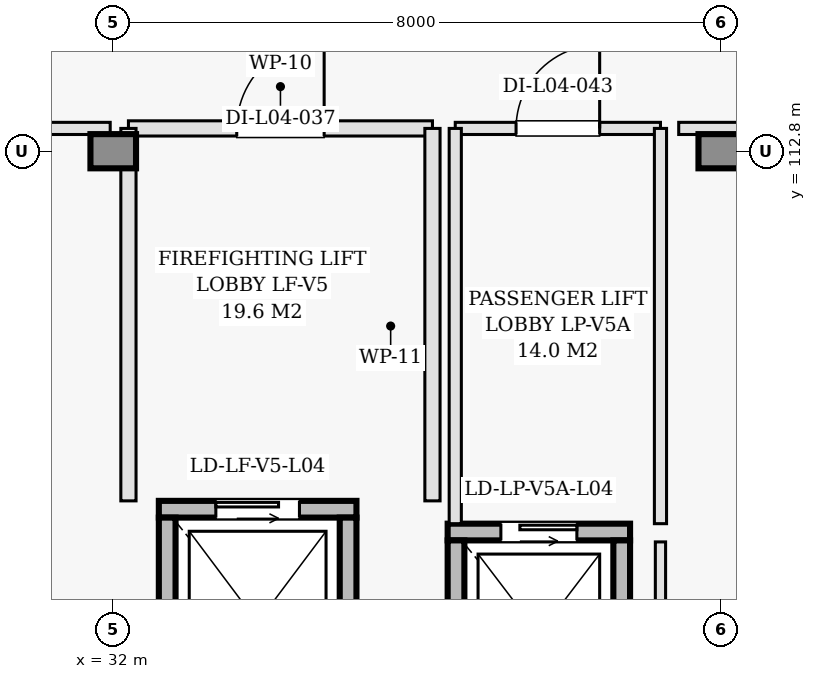
"""IFC4 building model, lengths in metres.
Left out: names, types, materials, properties, quantities, classifications, styles, units other than length and angle.
Written with IfcOpenShell. Run it as: python <this file> out.ifc"""

import sys

from ifc_helpers import new_model, si_unit, direction, frame, frame_2d, origin, origin_2d, place, context, subcontext, project, spatial, rectangle, extrude, element, fill, save


model = new_model("IFC4")
c1 = context("Model", 3, precision=1e-05, world=origin(), true_north=direction((0.0, 1.0)))
c2 = subcontext(c1, "Body", "Model", "MODEL_VIEW")
j1 = project(units=[si_unit("LENGTHUNIT", "METRE"), si_unit("PLANEANGLEUNIT", "RADIAN")], contexts=[c1])
p1 = place(None, origin())
s1 = spatial("IfcSite", under=j1, at=p1, CompositionType="ELEMENT")
p2 = place(p1, origin())
s2 = spatial("IfcBuilding", under=s1, at=p2, CompositionType="ELEMENT")
p3 = place(p2, frame((0.0, 0.0, 18.0)))
s3 = spatial("IfcBuildingStorey", under=s2, at=p3, CompositionType="ELEMENT", Elevation=18.0)
for number, where, z_axis, x_axis in (
    (1, (32.0, 112.8, 0.0), (0.0, 0.0, 1.0), (1.0, 0.0, 0.0)),
    (2, (40.0, 112.8, 0.0), (0.0, 0.0, 1.0), (1.0, 0.0, 0.0)),
):
    element("IfcColumn", number, at=place(p3, frame(where, z_axis=z_axis, x_axis=x_axis)), inside=s3, PredefinedType="COLUMN", context=c2, shape_type="SweptSolid", body=[
        extrude(rectangle(XDim=0.45, YDim=0.45, at=origin_2d()), origin(), (0.0, 0.0, 1.0), 4.2),
    ])
p4 = place(p3, frame((32.6, 108.09, 0.0), z_axis=(0.0, 0.0, 1.0), x_axis=(1.0, 0.0, 0.0)))
e3 = element("IfcWall", 3, at=p4, inside=s3, PredefinedType="SHEAR", context=c2, shape_type="SweptSolid", body=[
    extrude(rectangle(XDim=2.6, YDim=0.22, at=frame_2d((1.3, 0.0))), origin(), (0.0, 0.0, 1.0), 3.85),
])
p5 = place(p4, frame((0.75, 0.0, 0.0)))
e4 = element("IfcOpeningElement", 4, at=p5, cuts=e3, PredefinedType="OPENING", context=c2, shape_type="SweptSolid", body=[
    extrude(rectangle(XDim=1.1, YDim=2.15, at=frame_2d((0.55, 1.075))), frame((0.0, 0.12, 0.0), z_axis=(0.0, -1.0, 0.0), x_axis=(1.0, 0.0, 0.0)), (0.0, 0.0, 1.0), 0.24),
])
for number, where, z_axis, x_axis in (
    (5, (32.71, 105.22, 0.0), (0.0, 0.0, 1.0), (0.0, 1.0, 0.0)),
    (6, (35.09, 105.22, 0.0), (0.0, 0.0, 1.0), (0.0, 1.0, 0.0)),
):
    element("IfcWall", number, at=place(p3, frame(where, z_axis=z_axis, x_axis=x_axis)), inside=s3, PredefinedType="SHEAR", context=c2, shape_type="SweptSolid", body=[
        extrude(rectangle(XDim=2.76, YDim=0.22, at=frame_2d((1.38, 0.0))), origin(), (0.0, 0.0, 1.0), 3.85),
    ])
p6 = place(p3, frame((32.2, 113.1, 0.0), z_axis=(0.0, 0.0, 1.0), x_axis=(1.0, 0.0, 0.0)))
e7 = element("IfcWall", 7, at=p6, inside=s3, PredefinedType="PARTITIONING", context=c2, shape_type="SweptSolid", body=[
    extrude(rectangle(XDim=4.0, YDim=0.2, at=frame_2d((2.0, 0.0))), origin(), (0.0, 0.0, 1.0), 3.85),
])
p7 = place(p6, frame((1.425, 0.0, 0.0)))
e8 = element("IfcOpeningElement", 8, at=p7, cuts=e7, PredefinedType="OPENING", context=c2, shape_type="SweptSolid", body=[
    extrude(rectangle(XDim=1.15, YDim=2.15, at=frame_2d((0.575, 1.075))), frame((0.0, 0.11, 0.0), z_axis=(0.0, -1.0, 0.0), x_axis=(1.0, 0.0, 0.0)), (0.0, 0.0, 1.0), 0.22),
])
for number, where, z_axis, x_axis in (
    (9, (32.2, 108.2, 0.0), (0.0, 0.0, 1.0), (0.0, 1.0, 0.0)),
    (10, (36.2, 108.2, 0.0), (0.0, 0.0, 1.0), (0.0, 1.0, 0.0)),
):
    element("IfcWall", number, at=place(p3, frame(where, z_axis=z_axis, x_axis=x_axis)), inside=s3, PredefinedType="PARTITIONING", context=c2, shape_type="SweptSolid", body=[
        extrude(rectangle(XDim=4.9, YDim=0.2, at=frame_2d((2.45, 0.0))), origin(), (0.0, 0.0, 1.0), 3.85),
    ])
p8 = place(p3, frame((36.4, 107.79, 0.0), z_axis=(0.0, 0.0, 1.0), x_axis=(1.0, 0.0, 0.0)))
e11 = element("IfcWall", 11, at=p8, inside=s3, PredefinedType="SHEAR", context=c2, shape_type="SweptSolid", body=[
    extrude(rectangle(XDim=2.4, YDim=0.22, at=frame_2d((1.2, 0.0))), origin(), (0.0, 0.0, 1.0), 3.85),
])
p9 = place(p8, frame((0.7, 0.0, 0.0)))
e12 = element("IfcOpeningElement", 12, at=p9, cuts=e11, PredefinedType="OPENING", context=c2, shape_type="SweptSolid", body=[
    extrude(rectangle(XDim=1.0, YDim=2.15, at=frame_2d((0.5, 1.075))), frame((0.0, 0.12, 0.0), z_axis=(0.0, -1.0, 0.0), x_axis=(1.0, 0.0, 0.0)), (0.0, 0.0, 1.0), 0.24),
])
for number, where, z_axis, x_axis in (
    (13, (36.51, 105.22, 0.0), (0.0, 0.0, 1.0), (0.0, 1.0, 0.0)),
    (14, (38.69, 105.22, 0.0), (0.0, 0.0, 1.0), (0.0, 1.0, 0.0)),
):
    element("IfcWall", number, at=place(p3, frame(where, z_axis=z_axis, x_axis=x_axis)), inside=s3, PredefinedType="SHEAR", context=c2, shape_type="SweptSolid", body=[
        extrude(rectangle(XDim=2.46, YDim=0.22, at=frame_2d((1.23, 0.0))), origin(), (0.0, 0.0, 1.0), 3.85),
    ])
p10 = place(p3, frame((36.5, 113.1, 0.0), z_axis=(0.0, 0.0, 1.0), x_axis=(1.0, 0.0, 0.0)))
e15 = element("IfcWall", 15, at=p10, inside=s3, PredefinedType="PARTITIONING", context=c2, shape_type="SweptSolid", body=[
    extrude(rectangle(XDim=2.7, YDim=0.16, at=frame_2d((1.35, 0.0))), origin(), (0.0, 0.0, 1.0), 3.85),
])
p11 = place(p10, frame((0.8, 0.0, 0.0)))
e16 = element("IfcOpeningElement", 16, at=p11, cuts=e15, PredefinedType="OPENING", context=c2, shape_type="SweptSolid", body=[
    extrude(rectangle(XDim=1.1, YDim=2.15, at=frame_2d((0.55, 1.075))), frame((0.0, 0.09, 0.0), z_axis=(0.0, -1.0, 0.0), x_axis=(1.0, 0.0, 0.0)), (0.0, 0.0, 1.0), 0.18),
])
for number, where, z_axis, x_axis in (
    (17, (36.5, 107.9, 0.0), (0.0, 0.0, 1.0), (0.0, 1.0, 0.0)),
    (18, (39.2, 107.9, 0.0), (0.0, 0.0, 1.0), (0.0, 1.0, 0.0)),
):
    element("IfcWall", number, at=place(p3, frame(where, z_axis=z_axis, x_axis=x_axis)), inside=s3, PredefinedType="PARTITIONING", context=c2, shape_type="SweptSolid", body=[
        extrude(rectangle(XDim=5.2, YDim=0.16, at=frame_2d((2.6, 0.0))), origin(), (0.0, 0.0, 1.0), 3.85),
    ])
p12 = place(p3, frame((39.44, 113.1, 0.0), z_axis=(0.0, 0.0, 1.0), x_axis=(1.0, 0.0, 0.0)))
e19 = element("IfcWall", 19, at=p12, inside=s3, PredefinedType="PARTITIONING", context=c2, shape_type="SweptSolid", body=[
    extrude(rectangle(XDim=38.014, YDim=0.16, at=frame_2d((19.007, 0.0))), origin(), (0.0, 0.0, 1.0), 3.94),
])
p13 = place(p3, frame((39.2, 95.105, 0.0), z_axis=(0.0, 0.0, 1.0), x_axis=(0.0, 1.0, 0.0)))
e20 = element("IfcWall", 20, at=p13, inside=s3, PredefinedType="PARTITIONING", context=c2, shape_type="SweptSolid", body=[
    extrude(rectangle(XDim=12.555, YDim=0.135, at=frame_2d((6.277, 0.0))), origin(), (0.0, 0.0, 1.0), 3.94),
])
p14 = place(p3, frame((29.087, 113.1, 0.0), z_axis=(0.0, 0.0, 1.0), x_axis=(1.0, 0.0, 0.0)))
e21 = element("IfcWall", 21, at=p14, inside=s3, PredefinedType="PARTITIONING", context=c2, shape_type="SweptSolid", body=[
    extrude(rectangle(XDim=2.873, YDim=0.16, at=frame_2d((1.437, 0.0))), origin(), (0.0, 0.0, 1.0), 3.94),
])
p15 = place(p5, origin())
e22 = element("IfcDoor", 22, at=p15, inside=s3, OperationType="SLIDING_TO_LEFT", PredefinedType="DOOR", context=c2, shape_type="SweptSolid", body=[
    extrude(rectangle(XDim=1.1, YDim=2.15, at=frame_2d((0.55, 1.075))), frame((0.0, 0.025, 0.0), z_axis=(0.0, -1.0, 0.0), x_axis=(1.0, 0.0, 0.0)), (0.0, 0.0, 1.0), 0.05),
])
fill(e4, e22)
p16 = place(p7, origin())
e23 = element("IfcDoor", 23, at=p16, inside=s3, OperationType="SINGLE_SWING_RIGHT", PredefinedType="DOOR", context=c2, shape_type="SweptSolid", body=[
    extrude(rectangle(XDim=1.15, YDim=2.15, at=frame_2d((0.575, 1.075))), frame((0.0, 0.025, 0.0), z_axis=(0.0, -1.0, 0.0), x_axis=(1.0, 0.0, 0.0)), (0.0, 0.0, 1.0), 0.05),
])
fill(e8, e23)
p17 = place(p9, origin())
e24 = element("IfcDoor", 24, at=p17, inside=s3, OperationType="SLIDING_TO_RIGHT", PredefinedType="DOOR", context=c2, shape_type="SweptSolid", body=[
    extrude(rectangle(XDim=1.0, YDim=2.15, at=frame_2d((0.5, 1.075))), frame((0.0, 0.025, 0.0), z_axis=(0.0, -1.0, 0.0), x_axis=(1.0, 0.0, 0.0)), (0.0, 0.0, 1.0), 0.05),
])
fill(e12, e24)
p18 = place(p11, origin())
e25 = element("IfcDoor", 25, at=p18, inside=s3, OperationType="SINGLE_SWING_RIGHT", PredefinedType="DOOR", context=c2, shape_type="SweptSolid", body=[
    extrude(rectangle(XDim=1.1, YDim=2.15, at=frame_2d((0.55, 1.075))), frame((0.0, 0.025, 0.0), z_axis=(0.0, -1.0, 0.0), x_axis=(1.0, 0.0, 0.0)), (0.0, 0.0, 1.0), 0.05),
])
fill(e16, e25)
save(model, sys.argv[1])
